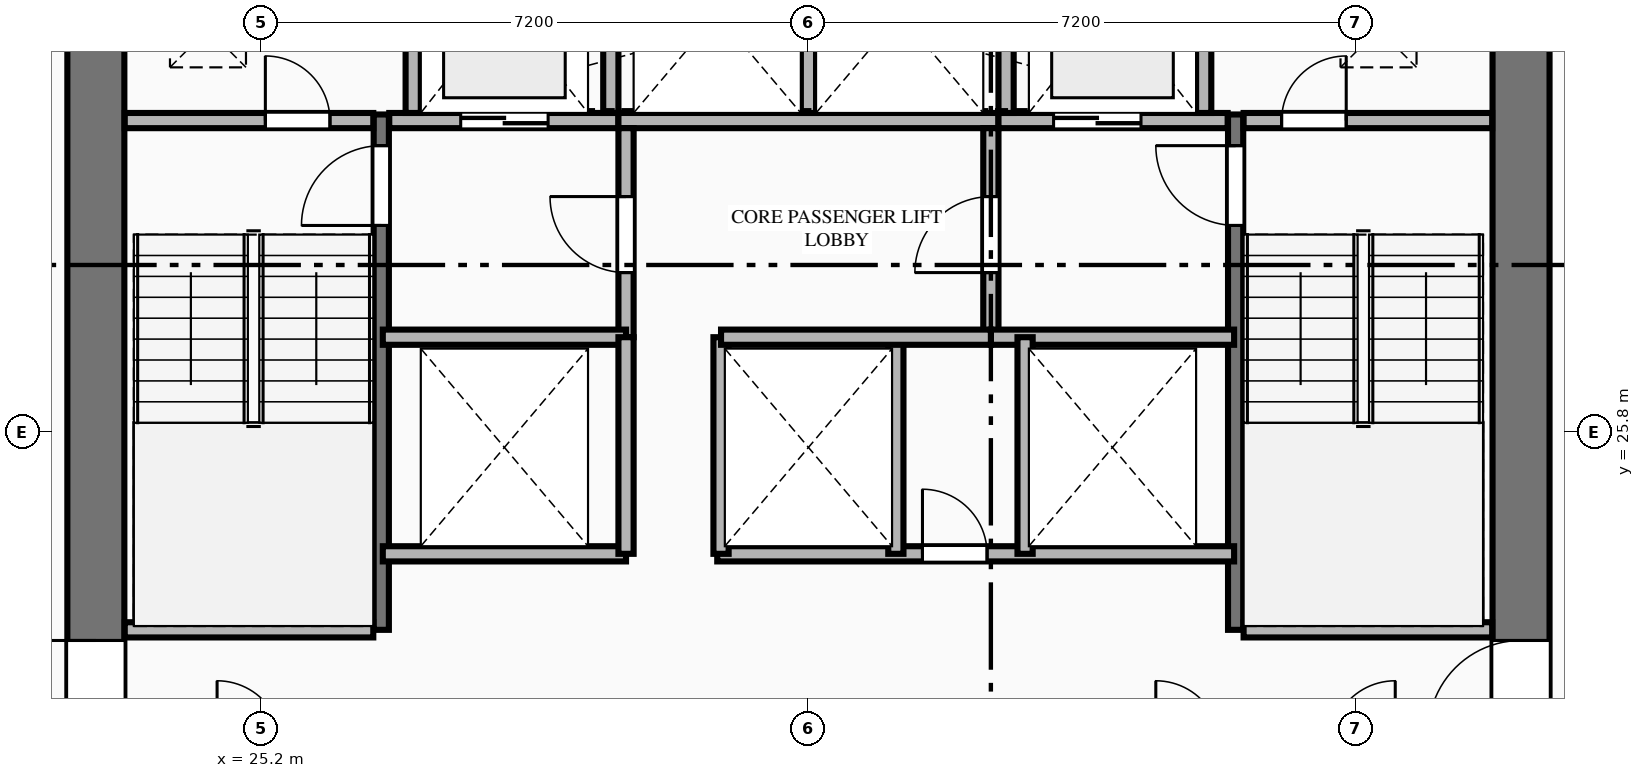
"""IFC4 building model, lengths in metres.
Left out: names, types, materials, properties, quantities, classifications, styles, units other than length and angle.
Written with IfcOpenShell. Run it as: python <this file> out.ifc"""

import sys

from ifc_helpers import new_model, si_unit, direction, frame, frame_2d, origin, place, context, subcontext, project, spatial, rectangle, extrude, element, fill, save


model = new_model("IFC4")
c1 = context("Model", 3, precision=1e-05, world=origin(), true_north=direction((0.0, 1.0)))
c2 = subcontext(c1, "Body", "Model", "MODEL_VIEW")
j1 = project(units=[si_unit("LENGTHUNIT", "METRE"), si_unit("PLANEANGLEUNIT", "RADIAN")], contexts=[c1])
p1 = place(None, origin())
s1 = spatial("IfcSite", under=j1, at=p1, CompositionType="ELEMENT")
p2 = place(p1, origin())
s2 = spatial("IfcBuilding", under=s1, at=p2, CompositionType="ELEMENT")
p3 = place(p2, frame((0.0, 0.0, 83.55)))
s3 = spatial("IfcBuildingStorey", under=s2, at=p3, CompositionType="ELEMENT", Elevation=83.55)
p4 = place(p3, frame((23.025, 18.9, 0.0), z_axis=(0.0, 0.0, 1.0), x_axis=(0.0, 1.0, 0.0)))
e1 = element("IfcWall", 1, at=p4, inside=s3, PredefinedType="SHEAR", context=c2, shape_type="SweptSolid", body=[
    extrude(rectangle(XDim=14.0, YDim=0.75, at=frame_2d((7.0, 0.0))), origin(), (0.0, 0.0, 1.0), 3.33),
])
p5 = place(p4, frame((2.94, 0.0, 0.0)))
e2 = element("IfcOpeningElement", 2, at=p5, cuts=e1, PredefinedType="OPENING", context=c2, shape_type="SweptSolid", body=[
    extrude(rectangle(XDim=1.22, YDim=2.25, at=frame_2d((0.61, 1.125))), frame((0.0, 0.385, 0.0), z_axis=(0.0, -1.0, 0.0), x_axis=(1.0, 0.0, 0.0)), (0.0, 0.0, 1.0), 0.77),
])
p6 = place(p3, frame((41.775, 18.9, 0.0), z_axis=(0.0, 0.0, 1.0), x_axis=(0.0, 1.0, 0.0)))
e3 = element("IfcWall", 3, at=p6, inside=s3, PredefinedType="SHEAR", context=c2, shape_type="SweptSolid", body=[
    extrude(rectangle(XDim=14.0, YDim=0.75, at=frame_2d((7.0, 0.0))), origin(), (0.0, 0.0, 1.0), 3.33),
])
p7 = place(p6, frame((2.94, 0.0, 0.0)))
e4 = element("IfcOpeningElement", 4, at=p7, cuts=e3, PredefinedType="OPENING", context=c2, shape_type="SweptSolid", body=[
    extrude(rectangle(XDim=1.22, YDim=2.25, at=frame_2d((0.61, 1.125))), frame((0.0, 0.385, 0.0), z_axis=(0.0, -1.0, 0.0), x_axis=(1.0, 0.0, 0.0)), (0.0, 0.0, 1.0), 0.77),
])
p8 = place(p3, frame((26.78, 23.2, 0.0), z_axis=(0.0, 0.0, 1.0), x_axis=(0.0, 1.0, 0.0)))
e5 = element("IfcWall", 5, at=p8, inside=s3, PredefinedType="SHEAR", context=c2, shape_type="SweptSolid", body=[
    extrude(rectangle(XDim=6.78, YDim=0.2, at=frame_2d((3.39, 0.0))), origin(), (0.0, 0.0, 1.0), 3.55),
])
p9 = place(p8, frame((5.32, 0.0, 0.0)))
e6 = element("IfcOpeningElement", 6, at=p9, cuts=e5, PredefinedType="OPENING", context=c2, shape_type="SweptSolid", body=[
    extrude(rectangle(XDim=1.05, YDim=2.15, at=frame_2d((0.525, 1.075))), frame((0.0, 0.11, 0.0), z_axis=(0.0, -1.0, 0.0), x_axis=(1.0, 0.0, 0.0)), (0.0, 0.0, 1.0), 0.22),
])
p10 = place(p3, frame((23.405, 23.2, 0.0), z_axis=(0.0, 0.0, 1.0), x_axis=(1.0, 0.0, 0.0)))
e7 = element("IfcWall", 7, at=p10, inside=s3, PredefinedType="PLUMBINGWALL", context=c2, shape_type="SweptSolid", body=[
    extrude(rectangle(XDim=3.27, YDim=0.2, at=frame_2d((1.635, 0.0))), origin(), (0.0, 0.0, 1.0), 3.33),
])
p11 = place(p3, frame((38.02, 23.2, 0.0), z_axis=(0.0, 0.0, 1.0), x_axis=(0.0, 1.0, 0.0)))
e8 = element("IfcWall", 8, at=p11, inside=s3, PredefinedType="SHEAR", context=c2, shape_type="SweptSolid", body=[
    extrude(rectangle(XDim=6.78, YDim=0.2, at=frame_2d((3.39, 0.0))), origin(), (0.0, 0.0, 1.0), 3.55),
])
p12 = place(p11, frame((5.32, 0.0, 0.0)))
e9 = element("IfcOpeningElement", 9, at=p12, cuts=e8, PredefinedType="OPENING", context=c2, shape_type="SweptSolid", body=[
    extrude(rectangle(XDim=1.05, YDim=2.15, at=frame_2d((0.525, 1.075))), frame((0.0, 0.11, 0.0), z_axis=(0.0, -1.0, 0.0), x_axis=(1.0, 0.0, 0.0)), (0.0, 0.0, 1.0), 0.22),
])
p13 = place(p3, frame((38.125, 23.2, 0.0), z_axis=(0.0, 0.0, 1.0), x_axis=(1.0, 0.0, 0.0)))
e10 = element("IfcWall", 10, at=p13, inside=s3, PredefinedType="PLUMBINGWALL", context=c2, shape_type="SweptSolid", body=[
    extrude(rectangle(XDim=3.27, YDim=0.2, at=frame_2d((1.635, 0.0))), origin(), (0.0, 0.0, 1.0), 3.33),
])
p14 = place(p3, frame((23.405, 29.9, 0.0), z_axis=(0.0, 0.0, 1.0), x_axis=(1.0, 0.0, 0.0)))
e11 = element("IfcWall", 11, at=p14, inside=s3, PredefinedType="PLUMBINGWALL", context=c2, shape_type="SweptSolid", body=[
    extrude(rectangle(XDim=3.27, YDim=0.2, at=frame_2d((1.635, 0.0))), origin(), (0.0, 0.0, 1.0), 3.33),
])
p15 = place(p14, frame((1.85, 0.0, 0.0)))
e12 = element("IfcOpeningElement", 12, at=p15, cuts=e11, PredefinedType="OPENING", context=c2, shape_type="SweptSolid", body=[
    extrude(rectangle(XDim=0.85, YDim=2.05, at=frame_2d((0.425, 1.025))), frame((0.0, 0.11, 0.0), z_axis=(0.0, -1.0, 0.0), x_axis=(1.0, 0.0, 0.0)), (0.0, 0.0, 1.0), 0.22),
])
p16 = place(p3, frame((26.885, 29.9, 0.0), z_axis=(0.0, 0.0, 1.0), x_axis=(1.0, 0.0, 0.0)))
e13 = element("IfcWall", 13, at=p16, inside=s3, PredefinedType="PLUMBINGWALL", context=c2, shape_type="SweptSolid", body=[
    extrude(rectangle(XDim=3.015, YDim=0.2, at=frame_2d((1.507, 0.0))), origin(), (0.0, 0.0, 1.0), 3.33),
])
p17 = place(p16, frame((0.94, 0.0, 0.0)))
e14 = element("IfcOpeningElement", 14, at=p17, cuts=e13, PredefinedType="OPENING", context=c2, shape_type="SweptSolid", body=[
    extrude(rectangle(XDim=1.15, YDim=2.2, at=frame_2d((0.575, 1.1))), frame((0.0, 0.11, 0.0), z_axis=(0.0, -1.0, 0.0), x_axis=(1.0, 0.0, 0.0)), (0.0, 0.0, 1.0), 0.22),
])
p18 = place(p3, frame((29.9, 29.9, 0.0), z_axis=(0.0, 0.0, 1.0), x_axis=(1.0, 0.0, 0.0)))
e15 = element("IfcWall", 15, at=p18, inside=s3, PredefinedType="PLUMBINGWALL", context=c2, shape_type="SweptSolid", body=[
    extrude(rectangle(XDim=5.0, YDim=0.2, at=frame_2d((2.5, 0.0))), origin(), (0.0, 0.0, 1.0), 3.33),
])
p19 = place(p3, frame((34.9, 29.9, 0.0), z_axis=(0.0, 0.0, 1.0), x_axis=(1.0, 0.0, 0.0)))
e16 = element("IfcWall", 16, at=p19, inside=s3, PredefinedType="PLUMBINGWALL", context=c2, shape_type="SweptSolid", body=[
    extrude(rectangle(XDim=3.015, YDim=0.2, at=frame_2d((1.508, 0.0))), origin(), (0.0, 0.0, 1.0), 3.33),
])
p20 = place(p19, frame((0.725, 0.0, 0.0)))
e17 = element("IfcOpeningElement", 17, at=p20, cuts=e16, PredefinedType="OPENING", context=c2, shape_type="SweptSolid", body=[
    extrude(rectangle(XDim=1.15, YDim=2.2, at=frame_2d((0.575, 1.1))), frame((0.0, 0.11, 0.0), z_axis=(0.0, -1.0, 0.0), x_axis=(1.0, 0.0, 0.0)), (0.0, 0.0, 1.0), 0.22),
])
p21 = place(p3, frame((38.125, 29.9, 0.0), z_axis=(0.0, 0.0, 1.0), x_axis=(1.0, 0.0, 0.0)))
e18 = element("IfcWall", 18, at=p21, inside=s3, PredefinedType="PLUMBINGWALL", context=c2, shape_type="SweptSolid", body=[
    extrude(rectangle(XDim=3.27, YDim=0.2, at=frame_2d((1.635, 0.0))), origin(), (0.0, 0.0, 1.0), 3.33),
])
p22 = place(p21, frame((0.5, 0.0, 0.0)))
e19 = element("IfcOpeningElement", 19, at=p22, cuts=e18, PredefinedType="OPENING", context=c2, shape_type="SweptSolid", body=[
    extrude(rectangle(XDim=0.85, YDim=2.05, at=frame_2d((0.425, 1.025))), frame((0.0, 0.11, 0.0), z_axis=(0.0, -1.0, 0.0), x_axis=(1.0, 0.0, 0.0)), (0.0, 0.0, 1.0), 0.22),
])
for number, where, z_axis, x_axis in (
    (20, (27.2, 30.0, 0.0), (0.0, 0.0, 1.0), (0.0, 1.0, 0.0)),
    (21, (29.8, 30.0, 0.0), (0.0, 0.0, 1.0), (0.0, 1.0, 0.0)),
    (22, (32.4, 30.0, 0.0), (0.0, 0.0, 1.0), (0.0, 1.0, 0.0)),
    (23, (35.0, 30.0, 0.0), (0.0, 0.0, 1.0), (0.0, 1.0, 0.0)),
    (24, (37.6, 30.0, 0.0), (0.0, 0.0, 1.0), (0.0, 1.0, 0.0)),
):
    element("IfcWall", number, at=place(p3, frame(where, z_axis=z_axis, x_axis=x_axis)), inside=s3, PredefinedType="PLUMBINGWALL", context=c2, shape_type="SweptSolid", body=[
        extrude(rectangle(XDim=2.85, YDim=0.2, at=frame_2d((1.425, 0.0))), origin(), (0.0, 0.0, 1.0), 3.33),
    ])
p23 = place(p3, frame((30.0, 27.05, 0.0), z_axis=(0.0, 0.0, 1.0), x_axis=(0.0, 1.0, 0.0)))
e25 = element("IfcWall", 25, at=p23, inside=s3, PredefinedType="PLUMBINGWALL", context=c2, shape_type="SweptSolid", body=[
    extrude(rectangle(XDim=2.75, YDim=0.2, at=frame_2d((1.375, 0.0))), origin(), (0.0, 0.0, 1.0), 3.33),
])
p24 = place(p23, frame((0.85, 0.0, 0.0)))
e26 = element("IfcOpeningElement", 26, at=p24, cuts=e25, PredefinedType="OPENING", context=c2, shape_type="SweptSolid", body=[
    extrude(rectangle(XDim=1.0, YDim=2.15, at=frame_2d((0.5, 1.075))), frame((0.0, 0.11, 0.0), z_axis=(0.0, -1.0, 0.0), x_axis=(1.0, 0.0, 0.0)), (0.0, 0.0, 1.0), 0.22),
])
p25 = place(p3, frame((26.8, 27.05, 0.0), z_axis=(0.0, 0.0, 1.0), x_axis=(1.0, 0.0, 0.0)))
e27 = element("IfcWall", 27, at=p25, inside=s3, PredefinedType="PLUMBINGWALL", context=c2, shape_type="SweptSolid", body=[
    extrude(rectangle(XDim=3.2, YDim=0.2, at=frame_2d((1.6, 0.0))), origin(), (0.0, 0.0, 1.0), 3.33),
])
p26 = place(p3, frame((34.8, 27.05, 0.0), z_axis=(0.0, 0.0, 1.0), x_axis=(0.0, 1.0, 0.0)))
e28 = element("IfcWall", 28, at=p26, inside=s3, PredefinedType="PLUMBINGWALL", context=c2, shape_type="SweptSolid", body=[
    extrude(rectangle(XDim=2.75, YDim=0.2, at=frame_2d((1.375, 0.0))), origin(), (0.0, 0.0, 1.0), 3.33),
])
p27 = place(p26, frame((0.85, 0.0, 0.0)))
e29 = element("IfcOpeningElement", 29, at=p27, cuts=e28, PredefinedType="OPENING", context=c2, shape_type="SweptSolid", body=[
    extrude(rectangle(XDim=1.0, YDim=2.15, at=frame_2d((0.5, 1.075))), frame((0.0, 0.11, 0.0), z_axis=(0.0, -1.0, 0.0), x_axis=(1.0, 0.0, 0.0)), (0.0, 0.0, 1.0), 0.22),
])
for number, where, z_axis, x_axis in (
    (30, (34.8, 27.05, 0.0), (0.0, 0.0, 1.0), (1.0, 0.0, 0.0)),
    (31, (26.8, 24.2, 0.0), (0.0, 0.0, 1.0), (1.0, 0.0, 0.0)),
):
    element("IfcWall", number, at=place(p3, frame(where, z_axis=z_axis, x_axis=x_axis)), inside=s3, PredefinedType="PLUMBINGWALL", context=c2, shape_type="SweptSolid", body=[
        extrude(rectangle(XDim=3.2, YDim=0.2, at=frame_2d((1.6, 0.0))), origin(), (0.0, 0.0, 1.0), 3.33),
    ])
p28 = place(p3, frame((30.0, 24.2, 0.0), z_axis=(0.0, 0.0, 1.0), x_axis=(0.0, 1.0, 0.0)))
e32 = element("IfcWall", 32, at=p28, inside=s3, PredefinedType="PLUMBINGWALL", context=c2, shape_type="SweptSolid", body=[
    extrude(rectangle(XDim=2.85, YDim=0.2, at=frame_2d((1.425, 0.0))), origin(), (0.0, 0.0, 1.0), 3.33),
])
p29 = place(p3, frame((31.2, 24.2, 0.0), z_axis=(0.0, 0.0, 1.0), x_axis=(1.0, 0.0, 0.0)))
e33 = element("IfcWall", 33, at=p29, inside=s3, PredefinedType="PLUMBINGWALL", context=c2, shape_type="SweptSolid", body=[
    extrude(rectangle(XDim=6.8, YDim=0.2, at=frame_2d((3.4, 0.0))), origin(), (0.0, 0.0, 1.0), 3.33),
])
p30 = place(p29, frame((2.7, 0.0, 0.0)))
e34 = element("IfcOpeningElement", 34, at=p30, cuts=e33, PredefinedType="OPENING", context=c2, shape_type="SweptSolid", body=[
    extrude(rectangle(XDim=0.85, YDim=2.05, at=frame_2d((0.425, 1.025))), frame((0.0, 0.11, 0.0), z_axis=(0.0, -1.0, 0.0), x_axis=(1.0, 0.0, 0.0)), (0.0, 0.0, 1.0), 0.22),
])
for number, where, z_axis, x_axis in (
    (35, (31.25, 24.2, 0.0), (0.0, 0.0, 1.0), (0.0, 1.0, 0.0)),
    (36, (33.55, 24.2, 0.0), (0.0, 0.0, 1.0), (0.0, 1.0, 0.0)),
    (37, (35.25, 24.2, 0.0), (0.0, 0.0, 1.0), (0.0, 1.0, 0.0)),
):
    element("IfcWall", number, at=place(p3, frame(where, z_axis=z_axis, x_axis=x_axis)), inside=s3, PredefinedType="PLUMBINGWALL", context=c2, shape_type="SweptSolid", body=[
        extrude(rectangle(XDim=2.85, YDim=0.2, at=frame_2d((1.425, 0.0))), origin(), (0.0, 0.0, 1.0), 3.33),
    ])
p31 = place(p3, frame((31.25, 27.05, 0.0), z_axis=(0.0, 0.0, 1.0), x_axis=(1.0, 0.0, 0.0)))
e38 = element("IfcWall", 38, at=p31, inside=s3, PredefinedType="PLUMBINGWALL", context=c2, shape_type="SweptSolid", body=[
    extrude(rectangle(XDim=3.55, YDim=0.2, at=frame_2d((1.775, 0.0))), origin(), (0.0, 0.0, 1.0), 3.33),
])
p32 = place(p5, origin())
e39 = element("IfcDoor", 39, at=p32, inside=s3, OperationType="SINGLE_SWING_RIGHT", PredefinedType="DOOR", context=c2, shape_type="SweptSolid", body=[
    extrude(rectangle(XDim=1.22, YDim=2.25, at=frame_2d((0.61, 1.125))), frame((0.0, 0.025, 0.0), z_axis=(0.0, -1.0, 0.0), x_axis=(1.0, 0.0, 0.0)), (0.0, 0.0, 1.0), 0.05),
])
fill(e2, e39)
p33 = place(p7, origin())
e40 = element("IfcDoor", 40, at=p33, inside=s3, OperationType="SINGLE_SWING_LEFT", PredefinedType="DOOR", context=c2, shape_type="SweptSolid", body=[
    extrude(rectangle(XDim=1.22, YDim=2.25, at=frame_2d((0.61, 1.125))), frame((0.0, 0.025, 0.0), z_axis=(0.0, -1.0, 0.0), x_axis=(1.0, 0.0, 0.0)), (0.0, 0.0, 1.0), 0.05),
])
fill(e4, e40)
p34 = place(p9, origin())
e41 = element("IfcDoor", 41, at=p34, inside=s3, OperationType="SINGLE_SWING_LEFT", PredefinedType="DOOR", context=c2, shape_type="SweptSolid", body=[
    extrude(rectangle(XDim=1.05, YDim=2.15, at=frame_2d((0.525, 1.075))), frame((0.0, 0.025, 0.0), z_axis=(0.0, -1.0, 0.0), x_axis=(1.0, 0.0, 0.0)), (0.0, 0.0, 1.0), 0.05),
])
fill(e6, e41)
p35 = place(p12, origin())
e42 = element("IfcDoor", 42, at=p35, inside=s3, OperationType="SINGLE_SWING_RIGHT", PredefinedType="DOOR", context=c2, shape_type="SweptSolid", body=[
    extrude(rectangle(XDim=1.05, YDim=2.15, at=frame_2d((0.525, 1.075))), frame((0.0, 0.025, 0.0), z_axis=(0.0, -1.0, 0.0), x_axis=(1.0, 0.0, 0.0)), (0.0, 0.0, 1.0), 0.05),
])
fill(e9, e42)
p36 = place(p15, origin())
e43 = element("IfcDoor", 43, at=p36, inside=s3, OperationType="SINGLE_SWING_LEFT", PredefinedType="DOOR", context=c2, shape_type="SweptSolid", body=[
    extrude(rectangle(XDim=0.85, YDim=2.05, at=frame_2d((0.425, 1.025))), frame((0.0, 0.025, 0.0), z_axis=(0.0, -1.0, 0.0), x_axis=(1.0, 0.0, 0.0)), (0.0, 0.0, 1.0), 0.05),
])
fill(e12, e43)
p37 = place(p22, origin())
e44 = element("IfcDoor", 44, at=p37, inside=s3, OperationType="SINGLE_SWING_RIGHT", PredefinedType="DOOR", context=c2, shape_type="SweptSolid", body=[
    extrude(rectangle(XDim=0.85, YDim=2.05, at=frame_2d((0.425, 1.025))), frame((0.0, 0.025, 0.0), z_axis=(0.0, -1.0, 0.0), x_axis=(1.0, 0.0, 0.0)), (0.0, 0.0, 1.0), 0.05),
])
fill(e19, e44)
p38 = place(p17, origin())
e45 = element("IfcDoor", 45, at=p38, inside=s3, OperationType="DOUBLE_DOOR_SLIDING", PredefinedType="DOOR", context=c2, shape_type="SweptSolid", body=[
    extrude(rectangle(XDim=1.15, YDim=2.2, at=frame_2d((0.575, 1.1))), frame((0.0, 0.025, 0.0), z_axis=(0.0, -1.0, 0.0), x_axis=(1.0, 0.0, 0.0)), (0.0, 0.0, 1.0), 0.05),
])
fill(e14, e45)
p39 = place(p20, origin())
e46 = element("IfcDoor", 46, at=p39, inside=s3, OperationType="DOUBLE_DOOR_SLIDING", PredefinedType="DOOR", context=c2, shape_type="SweptSolid", body=[
    extrude(rectangle(XDim=1.15, YDim=2.2, at=frame_2d((0.575, 1.1))), frame((0.0, 0.025, 0.0), z_axis=(0.0, -1.0, 0.0), x_axis=(1.0, 0.0, 0.0)), (0.0, 0.0, 1.0), 0.05),
])
fill(e17, e46)
p40 = place(p24, origin())
e47 = element("IfcDoor", 47, at=p40, inside=s3, OperationType="SINGLE_SWING_RIGHT", PredefinedType="DOOR", context=c2, shape_type="SweptSolid", body=[
    extrude(rectangle(XDim=1.0, YDim=2.15, at=frame_2d((0.5, 1.075))), frame((0.0, 0.025, 0.0), z_axis=(0.0, -1.0, 0.0), x_axis=(1.0, 0.0, 0.0)), (0.0, 0.0, 1.0), 0.05),
])
fill(e26, e47)
p41 = place(p27, origin())
e48 = element("IfcDoor", 48, at=p41, inside=s3, OperationType="SINGLE_SWING_LEFT", PredefinedType="DOOR", context=c2, shape_type="SweptSolid", body=[
    extrude(rectangle(XDim=1.0, YDim=2.15, at=frame_2d((0.5, 1.075))), frame((0.0, 0.025, 0.0), z_axis=(0.0, -1.0, 0.0), x_axis=(1.0, 0.0, 0.0)), (0.0, 0.0, 1.0), 0.05),
])
fill(e29, e48)
p42 = place(p30, origin())
e49 = element("IfcDoor", 49, at=p42, inside=s3, OperationType="SINGLE_SWING_LEFT", PredefinedType="DOOR", context=c2, shape_type="SweptSolid", body=[
    extrude(rectangle(XDim=0.85, YDim=2.05, at=frame_2d((0.425, 1.025))), frame((0.0, 0.025, 0.0), z_axis=(0.0, -1.0, 0.0), x_axis=(1.0, 0.0, 0.0)), (0.0, 0.0, 1.0), 0.05),
])
fill(e34, e49)
save(model, sys.argv[1])
